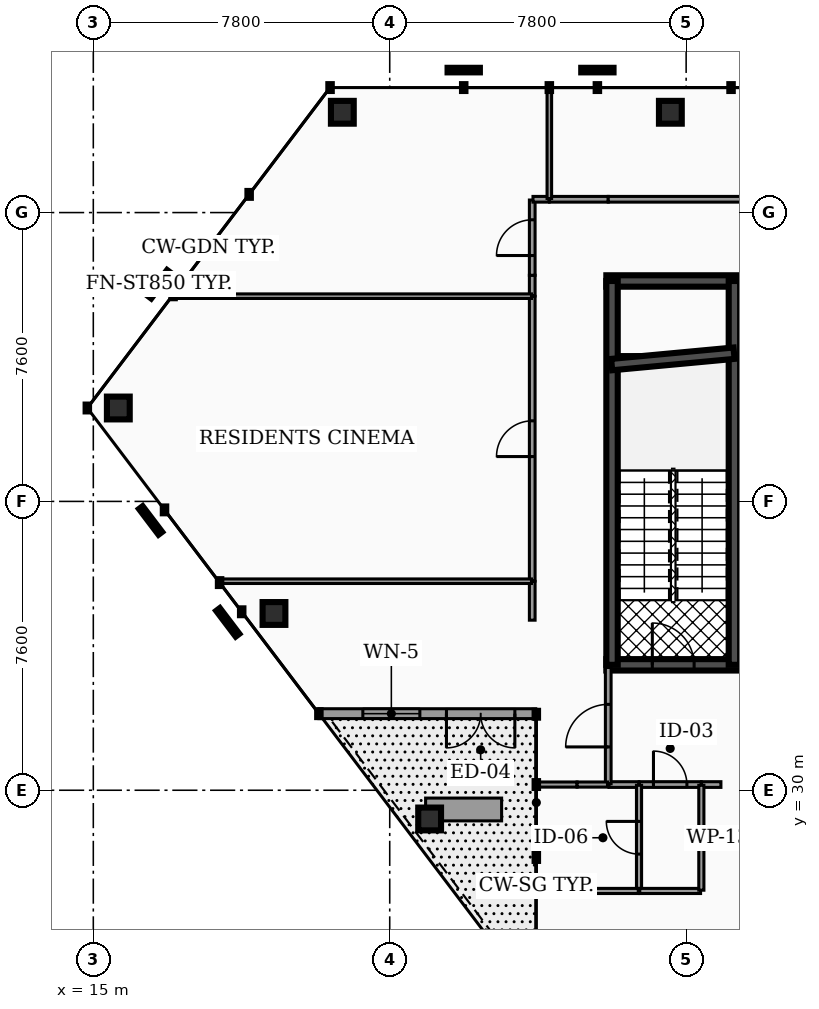
"""IFC4 building model, lengths in metres.
Left out: names, types, materials, properties, quantities, classifications, styles, units other than length and angle.
Written with IfcOpenShell. Run it as: python <this file> out.ifc"""

import sys

from ifc_helpers import new_model, si_unit, direction, frame, frame_2d, origin, origin_2d, place, context, subcontext, project, spatial, rectangle, hollow_rectangle, extrude, element, fill, save


model = new_model("IFC4")
c1 = context("Model", 3, precision=1e-05, world=origin(), true_north=direction((0.0, 1.0)))
c2 = subcontext(c1, "Body", "Model", "MODEL_VIEW")
j1 = project(units=[si_unit("LENGTHUNIT", "METRE"), si_unit("PLANEANGLEUNIT", "RADIAN")], contexts=[c1])
p1 = place(None, origin())
s1 = spatial("IfcSite", under=j1, at=p1, CompositionType="ELEMENT")
p2 = place(p1, origin())
s2 = spatial("IfcBuilding", under=s1, at=p2, CompositionType="ELEMENT")
p3 = place(p2, frame((0.0, 0.0, 199.92)))
s3 = spatial("IfcBuildingStorey", under=s2, at=p3, CompositionType="ELEMENT", Elevation=199.92)
p4 = place(p3, frame((28.5, 43.4, 0.0), z_axis=(0.0, 0.0, 1.0), x_axis=(1.0, 0.0, 0.0)))
e1 = element("IfcWall", 1, at=p4, inside=s3, PredefinedType="SHEAR", context=c2, shape_type="SweptSolid", body=[
    extrude(rectangle(XDim=19.86, YDim=0.3, at=frame_2d((9.93, 0.0))), origin(), (0.0, 0.0, 1.0), 4.12),
])
p5 = place(p3, frame((28.5, 33.3, 0.0), z_axis=(0.0, 0.0, 1.0), x_axis=(1.0, 0.0, 0.0)))
e2 = element("IfcWall", 2, at=p5, inside=s3, PredefinedType="SHEAR", context=c2, shape_type="SweptSolid", body=[
    extrude(rectangle(XDim=19.86, YDim=0.3, at=frame_2d((9.93, 0.0))), origin(), (0.0, 0.0, 1.0), 4.12),
])
p6 = place(p5, frame((3.93, 0.0, 0.0)))
e3 = element("IfcOpeningElement", 3, at=p6, cuts=e2, PredefinedType="OPENING", context=c2, shape_type="SweptSolid", body=[
    extrude(rectangle(XDim=1.1, YDim=2.15, at=frame_2d((0.55, 1.075))), frame((0.0, 0.16, 0.0), z_axis=(0.0, -1.0, 0.0), x_axis=(1.0, 0.0, 0.0)), (0.0, 0.0, 1.0), 0.32),
])
p7 = place(p5, frame((14.77, 0.0, 0.0)))
e4 = element("IfcOpeningElement", 4, at=p7, cuts=e2, PredefinedType="OPENING", context=c2, shape_type="SweptSolid", body=[
    extrude(rectangle(XDim=1.1, YDim=2.15, at=frame_2d((0.55, 1.075))), frame((0.0, 0.16, 0.0), z_axis=(0.0, -1.0, 0.0), x_axis=(1.0, 0.0, 0.0)), (0.0, 0.0, 1.0), 0.32),
])
p8 = place(p5, frame((11.25, 0.0, 0.0)))
e5 = element("IfcOpeningElement", 5, at=p8, cuts=e2, PredefinedType="OPENING", context=c2, shape_type="SweptSolid", body=[
    extrude(rectangle(XDim=1.0, YDim=2.1, at=frame_2d((0.5, 1.05))), frame((0.0, 0.16, 0.0), z_axis=(0.0, -1.0, 0.0), x_axis=(1.0, 0.0, 0.0)), (0.0, 0.0, 1.0), 0.32),
])
p9 = place(p5, frame((12.95, 0.0, 0.0)))
e6 = element("IfcOpeningElement", 6, at=p9, cuts=e2, PredefinedType="OPENING", context=c2, shape_type="SweptSolid", body=[
    extrude(rectangle(XDim=1.0, YDim=2.1, at=frame_2d((0.5, 1.05))), frame((0.0, 0.16, 0.0), z_axis=(0.0, -1.0, 0.0), x_axis=(1.0, 0.0, 0.0)), (0.0, 0.0, 1.0), 0.32),
])
p10 = place(p5, frame((5.85, 0.0, 0.0)))
e7 = element("IfcOpeningElement", 7, at=p10, cuts=e2, PredefinedType="OPENING", context=c2, shape_type="SweptSolid", body=[
    extrude(rectangle(XDim=1.0, YDim=2.1, at=frame_2d((0.5, 1.05))), frame((0.0, 0.16, 0.0), z_axis=(0.0, -1.0, 0.0), x_axis=(1.0, 0.0, 0.0)), (0.0, 0.0, 1.0), 0.32),
])
p11 = place(p5, frame((1.21, 0.0, 0.0)))
e8 = element("IfcOpeningElement", 8, at=p11, cuts=e2, PredefinedType="OPENING", context=c2, shape_type="SweptSolid", body=[
    extrude(rectangle(XDim=1.1, YDim=2.2, at=frame_2d((0.55, 1.1))), frame((0.0, 0.16, 0.0), z_axis=(0.0, -1.0, 0.0), x_axis=(1.0, 0.0, 0.0)), (0.0, 0.0, 1.0), 0.32),
])
p12 = place(p5, frame((9.34, 0.0, 0.0)))
e9 = element("IfcOpeningElement", 9, at=p12, cuts=e2, PredefinedType="OPENING", context=c2, shape_type="SweptSolid", body=[
    extrude(rectangle(XDim=1.12, YDim=2.05, at=frame_2d((0.56, 1.025))), frame((0.0, 0.16, 0.0), z_axis=(0.0, -1.0, 0.0), x_axis=(1.0, 0.0, 0.0)), (0.0, 0.0, 1.0), 0.32),
])
p13 = place(p5, frame((17.55, 0.0, 0.0)))
e10 = element("IfcOpeningElement", 10, at=p13, cuts=e2, PredefinedType="OPENING", context=c2, shape_type="SweptSolid", body=[
    extrude(rectangle(XDim=1.1, YDim=2.2, at=frame_2d((0.55, 1.1))), frame((0.0, 0.16, 0.0), z_axis=(0.0, -1.0, 0.0), x_axis=(1.0, 0.0, 0.0)), (0.0, 0.0, 1.0), 0.32),
])
for number, where, z_axis, x_axis in (
    (11, (28.65, 33.3, 0.0), (0.0, 0.0, 1.0), (0.0, 1.0, 0.0)),
    (12, (31.87, 33.3, 0.0), (0.0, 0.0, 1.0), (0.0, 1.0, 0.0)),
):
    element("IfcWall", number, at=place(p3, frame(where, z_axis=z_axis, x_axis=x_axis)), inside=s3, PredefinedType="SHEAR", context=c2, shape_type="SweptSolid", body=[
        extrude(rectangle(XDim=10.1, YDim=0.3, at=frame_2d((5.05, 0.0))), origin(), (0.0, 0.0, 1.0), 4.12),
    ])
p14 = place(p3, frame((28.64, 41.2, 0.0), z_axis=(0.0, 0.0, 1.0), x_axis=(0.995687118776, 0.092774789157, 0.0)))
e13 = element("IfcWall", 13, at=p14, inside=s3, PredefinedType="SHEAR", context=c2, shape_type="SweptSolid", body=[
    extrude(rectangle(XDim=3.234, YDim=0.3, at=frame_2d((1.617, 0.0))), origin(), (0.0, 0.0, 1.0), 4.12),
])
for number, where, z_axis, x_axis in (
    (14, (30.185, 47.839, 0.0), (0.0, 0.0, 1.0), (1.0, 0.0, 0.0)),
    (15, (21.553, 47.839, 0.0), (0.0, 0.0, 1.0), (1.0, 0.0, 0.0)),
    (16, (15.658, 40.058, 0.0), (0.0, 0.0, 1.0), (1.0, 0.0, 0.0)),
    (17, (19.754, 34.651, 0.0), (0.0, 0.0, 1.0), (1.0, 0.0, 0.0)),
):
    element("IfcColumn", number, at=place(p3, frame(where, z_axis=z_axis, x_axis=x_axis)), inside=s3, PredefinedType="COLUMN", context=c2, shape_type="SweptSolid", body=[
        extrude(hollow_rectangle(XDim=0.6, YDim=0.6, WallThickness=0.03, at=origin_2d()), origin(), (0.0, 0.0, 1.0), 4.12),
    ])
p15 = place(p3, frame((23.85, 29.244, 0.0), z_axis=(0.0, 0.0, 1.0), x_axis=(1.0, 0.0, 0.0)))
e18 = element("IfcColumn", 18, at=p15, inside=s3, PredefinedType="COLUMN", context=c2, shape_type="SweptSolid", body=[
    extrude(hollow_rectangle(XDim=0.6, YDim=0.6, WallThickness=0.03, at=origin_2d()), origin(), (0.0, 0.0, 1.0), 4.38),
])
p16 = place(p3, frame((26.643, 32.015, 0.0), z_axis=(0.0, 0.0, 1.0), x_axis=(-1.0, 0.0, 0.0)))
e19 = element("IfcWall", 19, at=p16, inside=s3, PredefinedType="STANDARD", context=c2, shape_type="SweptSolid", body=[
    extrude(rectangle(XDim=5.707, YDim=0.26, at=frame_2d((2.854, 0.0))), origin(), (0.0, 0.0, 1.0), 3.65),
])
p17 = place(p16, frame((0.55, 0.0, 0.0)))
e20 = element("IfcOpeningElement", 20, at=p17, cuts=e19, PredefinedType="OPENING", context=c2, shape_type="SweptSolid", body=[
    extrude(rectangle(XDim=1.8, YDim=2.2, at=frame_2d((0.9, 1.1))), frame((0.0, 0.14, 0.0), z_axis=(0.0, -1.0, 0.0), x_axis=(1.0, 0.0, 0.0)), (0.0, 0.0, 1.0), 0.28),
])
p18 = place(p16, frame((3.05, 0.0, 0.75)))
e21 = element("IfcOpeningElement", 21, at=p18, cuts=e19, PredefinedType="OPENING", context=c2, shape_type="SweptSolid", body=[
    extrude(rectangle(XDim=1.5, YDim=1.85, at=frame_2d((0.75, 0.925))), frame((0.0, 0.14, 0.0), z_axis=(0.0, -1.0, 0.0), x_axis=(1.0, 0.0, 0.0)), (0.0, 0.0, 1.0), 0.28),
])
p19 = place(p3, frame((23.744, 29.494, 0.0), z_axis=(0.0, 0.0, 1.0), x_axis=(1.0, 0.0, 0.0)))
e22 = element("IfcWall", 22, at=p19, inside=s3, PredefinedType="PARAPET", context=c2, shape_type="SweptSolid", body=[
    extrude(rectangle(XDim=2.0, YDim=0.6, at=frame_2d((1.0, 0.0))), origin(), (0.0, 0.0, 1.0), 0.6),
])
p20 = place(p3, frame((29.365, 30.15, 0.0), z_axis=(0.0, 0.0, 1.0), x_axis=(1.0, 0.0, 0.0)))
e23 = element("IfcWall", 23, at=p20, inside=s3, PredefinedType="PARTITIONING", context=c2, shape_type="SweptSolid", body=[
    extrude(rectangle(XDim=1.63, YDim=0.15, at=frame_2d((0.815, 0.0))), origin(), (0.0, 0.0, 1.0), 3.077),
])
p21 = place(p20, frame((0.375, 0.0, 0.0)))
e24 = element("IfcOpeningElement", 24, at=p21, cuts=e23, PredefinedType="OPENING", context=c2, shape_type="SweptSolid", body=[
    extrude(rectangle(XDim=0.88, YDim=2.05, at=frame_2d((0.44, 1.025))), frame((0.0, 0.085, 0.0), z_axis=(0.0, -1.0, 0.0), x_axis=(1.0, 0.0, 0.0)), (0.0, 0.0, 1.0), 0.17),
])
p22 = place(p3, frame((28.57, 30.15, 0.0), z_axis=(0.0, 0.0, 1.0), x_axis=(1.0, 0.0, 0.0)))
e25 = element("IfcWall", 25, at=p22, inside=s3, PredefinedType="PARTITIONING", context=c2, shape_type="SweptSolid", body=[
    extrude(rectangle(XDim=0.785, YDim=0.15, at=frame_2d((0.393, 0.0))), origin(), (0.0, 0.0, 1.0), 3.077),
])
p23 = place(p3, frame((31.005, 30.15, 0.0), z_axis=(0.0, 0.0, 1.0), x_axis=(1.0, 0.0, 0.0)))
e26 = element("IfcWall", 26, at=p23, inside=s3, PredefinedType="PARTITIONING", context=c2, shape_type="SweptSolid", body=[
    extrude(rectangle(XDim=0.51, YDim=0.15, at=frame_2d((0.255, 0.0))), origin(), (0.0, 0.0, 1.0), 3.077),
])
p24 = place(p3, frame((28.55, 30.17, 0.0), z_axis=(0.0, 0.0, 1.0), x_axis=(0.0, 1.0, 0.0)))
e27 = element("IfcWall", 27, at=p24, inside=s3, PredefinedType="PARTITIONING", context=c2, shape_type="SweptSolid", body=[
    extrude(rectangle(XDim=3.06, YDim=0.15, at=frame_2d((1.53, 0.0))), origin(), (0.0, 0.0, 1.0), 3.077),
])
p25 = place(p24, frame((0.97, 0.0, 0.0)))
e28 = element("IfcOpeningElement", 28, at=p25, cuts=e27, PredefinedType="OPENING", context=c2, shape_type="SweptSolid", body=[
    extrude(rectangle(XDim=1.12, YDim=2.05, at=frame_2d((0.56, 1.025))), frame((0.0, 0.085, 0.0), z_axis=(0.0, -1.0, 0.0), x_axis=(1.0, 0.0, 0.0)), (0.0, 0.0, 1.0), 0.17),
])
p26 = place(p3, frame((26.55, 34.475, 0.0), z_axis=(0.0, 0.0, 1.0), x_axis=(0.0, 1.0, 0.0)))
e29 = element("IfcWall", 29, at=p26, inside=s3, PredefinedType="PARTITIONING", context=c2, shape_type="SweptSolid", body=[
    extrude(rectangle(XDim=1.02, YDim=0.15, at=frame_2d((0.51, 0.0))), origin(), (0.0, 0.0, 1.0), 3.077),
])
p27 = place(p3, frame((26.55, 35.505, 0.0), z_axis=(0.0, 0.0, 1.0), x_axis=(0.0, 1.0, 0.0)))
e30 = element("IfcWall", 30, at=p27, inside=s3, PredefinedType="PARTITIONING", context=c2, shape_type="SweptSolid", body=[
    extrude(rectangle(XDim=7.49, YDim=0.15, at=frame_2d((3.745, 0.0))), origin(), (0.0, 0.0, 1.0), 3.077),
])
p28 = place(p27, frame((3.275, 0.0, 0.0)))
e31 = element("IfcOpeningElement", 31, at=p28, cuts=e30, PredefinedType="OPENING", context=c2, shape_type="SweptSolid", body=[
    extrude(rectangle(XDim=0.94, YDim=2.05, at=frame_2d((0.47, 1.025))), frame((0.0, 0.085, 0.0), z_axis=(0.0, -1.0, 0.0), x_axis=(1.0, 0.0, 0.0)), (0.0, 0.0, 1.0), 0.17),
])
p29 = place(p3, frame((26.55, 43.005, 0.0), z_axis=(0.0, 0.0, 1.0), x_axis=(0.0, 1.0, 0.0)))
e32 = element("IfcWall", 32, at=p29, inside=s3, PredefinedType="PARTITIONING", context=c2, shape_type="SweptSolid", body=[
    extrude(rectangle(XDim=0.545, YDim=0.15, at=frame_2d((0.272, 0.0))), origin(), (0.0, 0.0, 1.0), 3.077),
])
p30 = place(p3, frame((26.55, 43.55, 0.0), z_axis=(0.0, 0.0, 1.0), x_axis=(0.0, 1.0, 0.0)))
e33 = element("IfcWall", 33, at=p30, inside=s3, PredefinedType="PARTITIONING", context=c2, shape_type="SweptSolid", body=[
    extrude(rectangle(XDim=1.98, YDim=0.15, at=frame_2d((0.99, 0.0))), origin(), (0.0, 0.0, 1.0), 3.077),
])
p31 = place(p30, frame((0.52, 0.0, 0.0)))
e34 = element("IfcOpeningElement", 34, at=p31, cuts=e33, PredefinedType="OPENING", context=c2, shape_type="SweptSolid", body=[
    extrude(rectangle(XDim=0.94, YDim=2.05, at=frame_2d((0.47, 1.025))), frame((0.0, 0.085, 0.0), z_axis=(0.0, -1.0, 0.0), x_axis=(1.0, 0.0, 0.0)), (0.0, 0.0, 1.0), 0.17),
])
p32 = place(p3, frame((26.57, 45.55, 0.0), z_axis=(0.0, 0.0, 1.0), x_axis=(1.0, 0.0, 0.0)))
e35 = element("IfcWall", 35, at=p32, inside=s3, PredefinedType="PARTITIONING", context=c2, shape_type="SweptSolid", body=[
    extrude(rectangle(XDim=0.425, YDim=0.15, at=frame_2d((0.212, 0.0))), origin(), (0.0, 0.0, 1.0), 3.077),
])
p33 = place(p3, frame((27.005, 45.55, 0.0), z_axis=(0.0, 0.0, 1.0), x_axis=(1.0, 0.0, 0.0)))
e36 = element("IfcWall", 36, at=p33, inside=s3, PredefinedType="PARTITIONING", context=c2, shape_type="SweptSolid", body=[
    extrude(rectangle(XDim=1.545, YDim=0.15, at=frame_2d((0.772, 0.0))), origin(), (0.0, 0.0, 1.0), 3.077),
])
p34 = place(p3, frame((28.55, 45.55, 0.0), z_axis=(0.0, 0.0, 1.0), x_axis=(1.0, 0.0, 0.0)))
e37 = element("IfcWall", 37, at=p34, inside=s3, PredefinedType="PARTITIONING", context=c2, shape_type="SweptSolid", body=[
    extrude(rectangle(XDim=19.8, YDim=0.15, at=frame_2d((9.9, 0.0))), origin(), (0.0, 0.0, 1.0), 3.077),
])
p35 = place(p34, frame((9.34, 0.0, 0.0)))
e38 = element("IfcOpeningElement", 38, at=p35, cuts=e37, PredefinedType="OPENING", context=c2, shape_type="SweptSolid", body=[
    extrude(rectangle(XDim=1.12, YDim=2.05, at=frame_2d((0.56, 1.025))), frame((0.0, 0.085, 0.0), z_axis=(0.0, -1.0, 0.0), x_axis=(1.0, 0.0, 0.0)), (0.0, 0.0, 1.0), 0.17),
])
p36 = place(p3, frame((29.36, 27.37, 0.0), z_axis=(0.0, 0.0, 1.0), x_axis=(0.0, 1.0, 0.0)))
e39 = element("IfcWall", 39, at=p36, inside=s3, PredefinedType="PARTITIONING", context=c2, shape_type="SweptSolid", body=[
    extrude(rectangle(XDim=2.76, YDim=0.135, at=frame_2d((1.38, 0.0))), origin(), (0.0, 0.0, 1.0), 3.077),
])
p37 = place(p36, frame((0.95, 0.0, 0.0)))
e40 = element("IfcOpeningElement", 40, at=p37, cuts=e39, PredefinedType="OPENING", context=c2, shape_type="SweptSolid", body=[
    extrude(rectangle(XDim=0.86, YDim=2.05, at=frame_2d((0.43, 1.025))), frame((0.0, 0.077, 0.0), z_axis=(0.0, -1.0, 0.0), x_axis=(1.0, 0.0, 0.0)), (0.0, 0.0, 1.0), 0.155),
])
p38 = place(p3, frame((29.38, 27.35, 0.0), z_axis=(0.0, 0.0, 1.0), x_axis=(1.0, 0.0, 0.0)))
e41 = element("IfcWall", 41, at=p38, inside=s3, PredefinedType="PARTITIONING", context=c2, shape_type="SweptSolid", body=[
    extrude(rectangle(XDim=1.6, YDim=0.135, at=frame_2d((0.8, 0.0))), origin(), (0.0, 0.0, 1.0), 3.077),
])
p39 = place(p3, frame((31.0, 27.37, 0.0), z_axis=(0.0, 0.0, 1.0), x_axis=(0.0, 1.0, 0.0)))
e42 = element("IfcWall", 42, at=p39, inside=s3, PredefinedType="PARTITIONING", context=c2, shape_type="SweptSolid", body=[
    extrude(rectangle(XDim=2.76, YDim=0.135, at=frame_2d((1.38, 0.0))), origin(), (0.0, 0.0, 1.0), 3.077),
])
p40 = place(p3, frame((27.73, 27.35, 0.0), z_axis=(0.0, 0.0, 1.0), x_axis=(1.0, 0.0, 0.0)))
e43 = element("IfcWall", 43, at=p40, inside=s3, PredefinedType="PARTITIONING", context=c2, shape_type="SweptSolid", body=[
    extrude(rectangle(XDim=1.61, YDim=0.135, at=frame_2d((0.805, 0.0))), origin(), (0.0, 0.0, 1.0), 3.077),
])
for number, where, z_axis, x_axis in (
    (44, (26.673, 27.35, 0.0), (0.0, 0.0, 1.0), (1.0, 0.0, 0.0)),
    (45, (26.673, 30.15, 0.0), (0.0, 0.0, 1.0), (1.0, 0.0, 0.0)),
):
    element("IfcWall", number, at=place(p3, frame(where, z_axis=z_axis, x_axis=x_axis)), inside=s3, PredefinedType="PARTITIONING", context=c2, shape_type="SweptSolid", body=[
        extrude(rectangle(XDim=1.057, YDim=0.135, at=frame_2d((0.529, 0.0))), origin(), (0.0, 0.0, 1.0), 3.077),
    ])
p41 = place(p3, frame((27.73, 30.15, 0.0), z_axis=(0.0, 0.0, 1.0), x_axis=(1.0, 0.0, 0.0)))
e46 = element("IfcWall", 46, at=p41, inside=s3, PredefinedType="PARTITIONING", context=c2, shape_type="SweptSolid", body=[
    extrude(rectangle(XDim=0.8, YDim=0.135, at=frame_2d((0.4, 0.0))), origin(), (0.0, 0.0, 1.0), 3.077),
])
p42 = place(p3, frame((18.311, 35.5, 0.0), z_axis=(0.0, 0.0, 1.0), x_axis=(1.0, 0.0, 0.0)))
e47 = element("IfcWall", 47, at=p42, inside=s3, PredefinedType="PARTITIONING", context=c2, shape_type="SweptSolid", body=[
    extrude(rectangle(XDim=8.219, YDim=0.12, at=frame_2d((4.11, 0.0))), origin(), (0.0, 0.0, 1.0), 3.077),
])
p43 = place(p3, frame((17.087, 43.0, 0.0), z_axis=(0.0, 0.0, 1.0), x_axis=(1.0, 0.0, 0.0)))
e48 = element("IfcWall", 48, at=p43, inside=s3, PredefinedType="PARTITIONING", context=c2, shape_type="SweptSolid", body=[
    extrude(rectangle(XDim=9.443, YDim=0.12, at=frame_2d((4.722, 0.0))), origin(), (0.0, 0.0, 1.0), 3.077),
])
p44 = place(p3, frame((27.0, 45.57, 0.0), z_axis=(0.0, 0.0, 1.0), x_axis=(0.0, 1.0, 0.0)))
e49 = element("IfcWall", 49, at=p44, inside=s3, PredefinedType="PARTITIONING", context=c2, shape_type="SweptSolid", body=[
    extrude(rectangle(XDim=2.904, YDim=0.12, at=frame_2d((1.452, 0.0))), origin(), (0.0, 0.0, 1.0), 3.077),
])
p45 = place(p17, origin())
e50 = element("IfcDoor", 50, at=p45, inside=s3, OperationType="DOUBLE_DOOR_SINGLE_SWING", PredefinedType="DOOR", context=c2, shape_type="SweptSolid", body=[
    extrude(rectangle(XDim=1.8, YDim=2.2, at=frame_2d((0.9, 1.1))), frame((0.0, 0.025, 0.0), z_axis=(0.0, -1.0, 0.0), x_axis=(1.0, 0.0, 0.0)), (0.0, 0.0, 1.0), 0.05),
])
fill(e20, e50)
p46 = place(p18, origin())
e51 = element("IfcWindow", 51, at=p46, inside=s3, PartitioningType="SINGLE_PANEL", PredefinedType="WINDOW", context=c2, shape_type="SweptSolid", body=[
    extrude(rectangle(XDim=1.5, YDim=1.85, at=frame_2d((0.75, 0.925))), frame((0.0, 0.03, 0.0), z_axis=(0.0, -1.0, 0.0), x_axis=(1.0, 0.0, 0.0)), (0.0, 0.0, 1.0), 0.06),
])
fill(e21, e51)
p47 = place(p11, origin())
e52 = element("IfcDoor", 52, at=p47, inside=s3, OperationType="SINGLE_SWING_LEFT", PredefinedType="DOOR", context=c2, shape_type="SweptSolid", body=[
    extrude(rectangle(XDim=1.1, YDim=2.2, at=frame_2d((0.55, 1.1))), frame((0.0, 0.025, 0.0), z_axis=(0.0, -1.0, 0.0), x_axis=(1.0, 0.0, 0.0)), (0.0, 0.0, 1.0), 0.05),
])
fill(e8, e52)
p48 = place(p21, origin())
e53 = element("IfcDoor", 53, at=p48, inside=s3, OperationType="SINGLE_SWING_LEFT", PredefinedType="DOOR", context=c2, shape_type="SweptSolid", body=[
    extrude(rectangle(XDim=0.88, YDim=2.05, at=frame_2d((0.44, 1.025))), frame((0.0, 0.025, 0.0), z_axis=(0.0, -1.0, 0.0), x_axis=(1.0, 0.0, 0.0)), (0.0, 0.0, 1.0), 0.05),
])
fill(e24, e53)
p49 = place(p25, origin())
e54 = element("IfcDoor", 54, at=p49, inside=s3, OperationType="SINGLE_SWING_LEFT", PredefinedType="DOOR", context=c2, shape_type="SweptSolid", body=[
    extrude(rectangle(XDim=1.12, YDim=2.05, at=frame_2d((0.56, 1.025))), frame((0.0, 0.025, 0.0), z_axis=(0.0, -1.0, 0.0), x_axis=(1.0, 0.0, 0.0)), (0.0, 0.0, 1.0), 0.05),
])
fill(e28, e54)
p50 = place(p28, origin())
e55 = element("IfcDoor", 55, at=p50, inside=s3, OperationType="SINGLE_SWING_LEFT", PredefinedType="DOOR", context=c2, shape_type="SweptSolid", body=[
    extrude(rectangle(XDim=0.94, YDim=2.05, at=frame_2d((0.47, 1.025))), frame((0.0, 0.025, 0.0), z_axis=(0.0, -1.0, 0.0), x_axis=(1.0, 0.0, 0.0)), (0.0, 0.0, 1.0), 0.05),
])
fill(e31, e55)
p51 = place(p31, origin())
e56 = element("IfcDoor", 56, at=p51, inside=s3, OperationType="SINGLE_SWING_LEFT", PredefinedType="DOOR", context=c2, shape_type="SweptSolid", body=[
    extrude(rectangle(XDim=0.94, YDim=2.05, at=frame_2d((0.47, 1.025))), frame((0.0, 0.025, 0.0), z_axis=(0.0, -1.0, 0.0), x_axis=(1.0, 0.0, 0.0)), (0.0, 0.0, 1.0), 0.05),
])
fill(e34, e56)
p52 = place(p37, origin())
e57 = element("IfcDoor", 57, at=p52, inside=s3, OperationType="SINGLE_SWING_RIGHT", PredefinedType="DOOR", context=c2, shape_type="SweptSolid", body=[
    extrude(rectangle(XDim=0.86, YDim=2.05, at=frame_2d((0.43, 1.025))), frame((0.0, 0.025, 0.0), z_axis=(0.0, -1.0, 0.0), x_axis=(1.0, 0.0, 0.0)), (0.0, 0.0, 1.0), 0.05),
])
fill(e40, e57)
save(model, sys.argv[1])
